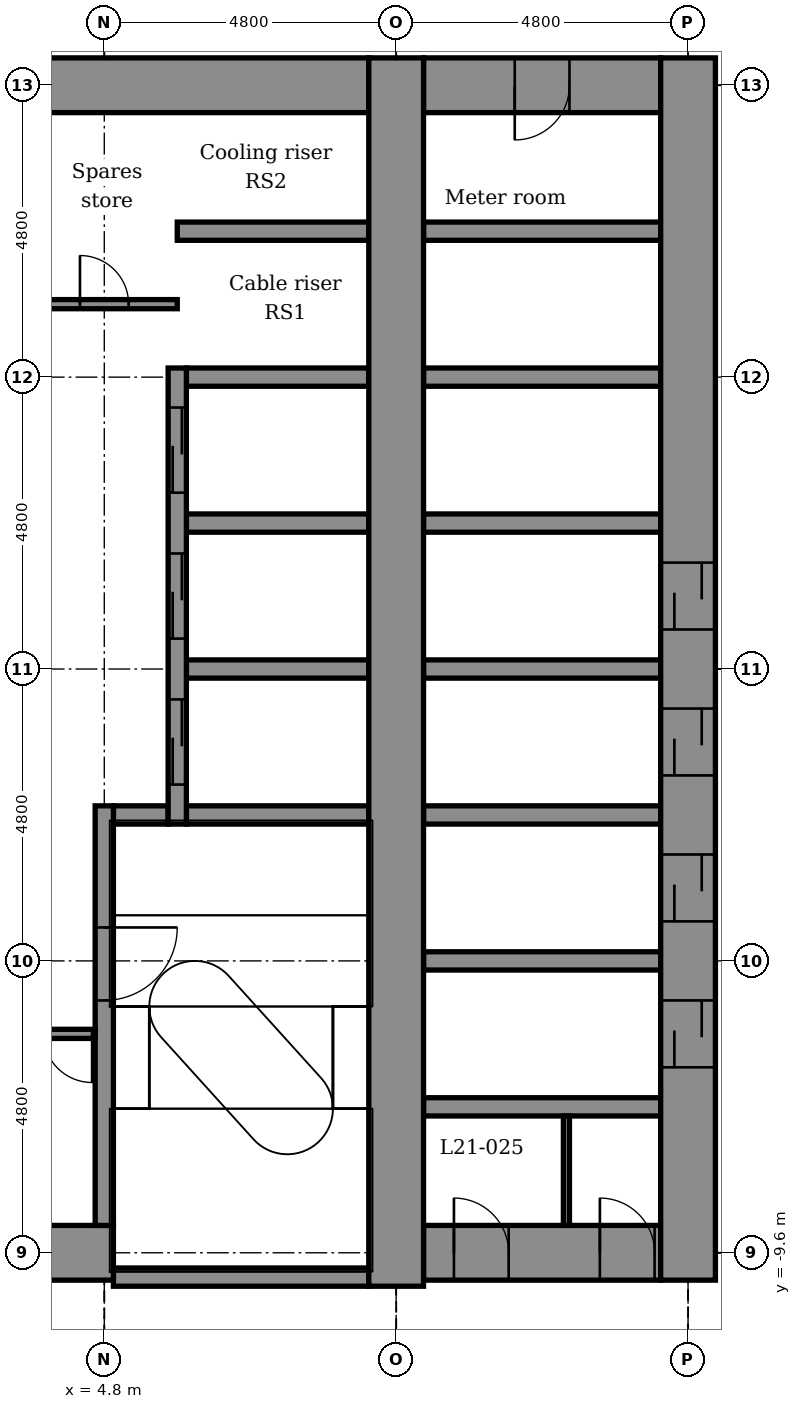
"""IFC4 building model, lengths in metres.
Left out: names, types, materials, properties, quantities, classifications, styles, units other than length and angle.
Written with IfcOpenShell. Run it as: python <this file> out.ifc"""

import sys

from ifc_helpers import new_model, si_unit, direction, frame, frame_2d, origin, place, context, subcontext, project, spatial, rectangle, extrude, element, fill, save


model = new_model("IFC4")
c1 = context("Model", 3, precision=1e-05, world=origin(), true_north=direction((0.0, 1.0)))
c2 = subcontext(c1, "Body", "Model", "MODEL_VIEW")
j1 = project(units=[si_unit("LENGTHUNIT", "METRE"), si_unit("PLANEANGLEUNIT", "RADIAN")], contexts=[c1])
p1 = place(None, origin())
s1 = spatial("IfcSite", under=j1, at=p1, CompositionType="ELEMENT")
p2 = place(p1, origin())
s2 = spatial("IfcBuilding", under=s1, at=p2, CompositionType="ELEMENT")
p3 = place(p2, frame((0.0, 0.0, 109.4)))
s3 = spatial("IfcBuildingStorey", under=s2, at=p3, CompositionType="ELEMENT", Elevation=109.4)
p4 = place(p3, frame((4.95, -10.0, -0.2), z_axis=(0.0, 0.0, 1.0), x_axis=(1.0, 0.0, 0.0)))
e1 = element("IfcWall", 1, at=p4, inside=s3, PredefinedType="STANDARD", context=c2, shape_type="SweptSolid", body=[
    extrude(rectangle(XDim=4.2, YDim=0.3, at=frame_2d((2.1, 0.0))), origin(), (0.0, 0.0, 1.0), 4.5),
])
p5 = place(p3, frame((-5.25, -9.6, -0.2), z_axis=(0.0, 0.0, 1.0), x_axis=(1.0, 0.0, 0.0)))
e2 = element("IfcWall", 2, at=p5, inside=s3, PredefinedType="SHEAR", context=c2, shape_type="SweptSolid", body=[
    extrude(rectangle(XDim=10.2, YDim=0.9, at=frame_2d((5.1, 0.0))), origin(), (0.0, 0.0, 1.0), 4.5),
])
p6 = place(p5, frame((0.6, 0.0, 0.2)))
e3 = element("IfcOpeningElement", 3, at=p6, cuts=e2, PredefinedType="OPENING", context=c2, shape_type="SweptSolid", body=[
    extrude(rectangle(XDim=0.9, YDim=2.1, at=frame_2d((0.45, 1.05))), frame((0.0, 0.46, 0.0), z_axis=(0.0, -1.0, 0.0), x_axis=(1.0, 0.0, 0.0)), (0.0, 0.0, 1.0), 0.92),
])
p7 = place(p3, frame((10.05, -9.6, -0.2), z_axis=(0.0, 0.0, 1.0), x_axis=(1.0, 0.0, 0.0)))
e4 = element("IfcWall", 4, at=p7, inside=s3, PredefinedType="SHEAR", context=c2, shape_type="SweptSolid", body=[
    extrude(rectangle(XDim=3.9, YDim=0.9, at=frame_2d((1.95, 0.0))), origin(), (0.0, 0.0, 1.0), 4.5),
])
p8 = place(p7, frame((0.5, 0.0, 0.2)))
e5 = element("IfcOpeningElement", 5, at=p8, cuts=e4, PredefinedType="OPENING", context=c2, shape_type="SweptSolid", body=[
    extrude(rectangle(XDim=0.9, YDim=2.1, at=frame_2d((0.45, 1.05))), frame((0.0, 0.46, 0.0), z_axis=(0.0, -1.0, 0.0), x_axis=(1.0, 0.0, 0.0)), (0.0, 0.0, 1.0), 0.92),
])
p9 = place(p7, frame((2.9, 0.0, 0.2)))
e6 = element("IfcOpeningElement", 6, at=p9, cuts=e4, PredefinedType="OPENING", context=c2, shape_type="SweptSolid", body=[
    extrude(rectangle(XDim=0.9, YDim=2.1, at=frame_2d((0.45, 1.05))), frame((0.0, 0.46, 0.0), z_axis=(0.0, -1.0, 0.0), x_axis=(1.0, 0.0, 0.0)), (0.0, 0.0, 1.0), 0.92),
])
for number, where, z_axis, x_axis in (
    (7, (10.05, -7.2, -0.2), (0.0, 0.0, 1.0), (1.0, 0.0, 0.0)),
    (8, (10.05, -4.8, -0.2), (0.0, 0.0, 1.0), (1.0, 0.0, 0.0)),
):
    element("IfcWall", number, at=place(p3, frame(where, z_axis=z_axis, x_axis=x_axis)), inside=s3, PredefinedType="STANDARD", context=c2, shape_type="SweptSolid", body=[
        extrude(rectangle(XDim=3.9, YDim=0.3, at=frame_2d((1.95, 0.0))), origin(), (0.0, 0.0, 1.0), 4.5),
    ])
p10 = place(p3, frame((4.95, -2.4, -0.2), z_axis=(0.0, 0.0, 1.0), x_axis=(1.0, 0.0, 0.0)))
e9 = element("IfcWall", 9, at=p10, inside=s3, PredefinedType="STANDARD", context=c2, shape_type="SweptSolid", body=[
    extrude(rectangle(XDim=0.9, YDim=0.3, at=frame_2d((0.45, 0.0))), origin(), (0.0, 0.0, 1.0), 4.5),
])
p11 = place(p3, frame((6.15, -2.4, -0.2), z_axis=(0.0, 0.0, 1.0), x_axis=(1.0, 0.0, 0.0)))
e10 = element("IfcWall", 10, at=p11, inside=s3, PredefinedType="STANDARD", context=c2, shape_type="SweptSolid", body=[
    extrude(rectangle(XDim=3.0, YDim=0.3, at=frame_2d((1.5, 0.0))), origin(), (0.0, 0.0, 1.0), 4.5),
])
p12 = place(p3, frame((10.05, -2.4, -0.2), z_axis=(0.0, 0.0, 1.0), x_axis=(1.0, 0.0, 0.0)))
e11 = element("IfcWall", 11, at=p12, inside=s3, PredefinedType="STANDARD", context=c2, shape_type="SweptSolid", body=[
    extrude(rectangle(XDim=3.9, YDim=0.3, at=frame_2d((1.95, 0.0))), origin(), (0.0, 0.0, 1.0), 4.5),
])
p13 = place(p3, frame((6.15, 0.0, -0.2), z_axis=(0.0, 0.0, 1.0), x_axis=(1.0, 0.0, 0.0)))
e12 = element("IfcWall", 12, at=p13, inside=s3, PredefinedType="STANDARD", context=c2, shape_type="SweptSolid", body=[
    extrude(rectangle(XDim=3.0, YDim=0.3, at=frame_2d((1.5, 0.0))), origin(), (0.0, 0.0, 1.0), 4.5),
])
p14 = place(p3, frame((10.05, 0.0, -0.2), z_axis=(0.0, 0.0, 1.0), x_axis=(1.0, 0.0, 0.0)))
e13 = element("IfcWall", 13, at=p14, inside=s3, PredefinedType="STANDARD", context=c2, shape_type="SweptSolid", body=[
    extrude(rectangle(XDim=3.9, YDim=0.3, at=frame_2d((1.95, 0.0))), origin(), (0.0, 0.0, 1.0), 4.5),
])
p15 = place(p3, frame((6.15, 2.4, -0.2), z_axis=(0.0, 0.0, 1.0), x_axis=(1.0, 0.0, 0.0)))
e14 = element("IfcWall", 14, at=p15, inside=s3, PredefinedType="STANDARD", context=c2, shape_type="SweptSolid", body=[
    extrude(rectangle(XDim=3.0, YDim=0.3, at=frame_2d((1.5, 0.0))), origin(), (0.0, 0.0, 1.0), 4.5),
])
p16 = place(p3, frame((10.05, 2.4, -0.2), z_axis=(0.0, 0.0, 1.0), x_axis=(1.0, 0.0, 0.0)))
e15 = element("IfcWall", 15, at=p16, inside=s3, PredefinedType="STANDARD", context=c2, shape_type="SweptSolid", body=[
    extrude(rectangle(XDim=3.9, YDim=0.3, at=frame_2d((1.95, 0.0))), origin(), (0.0, 0.0, 1.0), 4.5),
])
p17 = place(p3, frame((6.15, 4.8, -0.2), z_axis=(0.0, 0.0, 1.0), x_axis=(1.0, 0.0, 0.0)))
e16 = element("IfcWall", 16, at=p17, inside=s3, PredefinedType="STANDARD", context=c2, shape_type="SweptSolid", body=[
    extrude(rectangle(XDim=3.0, YDim=0.3, at=frame_2d((1.5, 0.0))), origin(), (0.0, 0.0, 1.0), 4.5),
])
p18 = place(p3, frame((10.05, 4.8, -0.2), z_axis=(0.0, 0.0, 1.0), x_axis=(1.0, 0.0, 0.0)))
e17 = element("IfcWall", 17, at=p18, inside=s3, PredefinedType="STANDARD", context=c2, shape_type="SweptSolid", body=[
    extrude(rectangle(XDim=3.9, YDim=0.3, at=frame_2d((1.95, 0.0))), origin(), (0.0, 0.0, 1.0), 4.5),
])
p19 = place(p3, frame((6.0, 7.2, -0.2), z_axis=(0.0, 0.0, 1.0), x_axis=(1.0, 0.0, 0.0)))
e18 = element("IfcWall", 18, at=p19, inside=s3, PredefinedType="STANDARD", context=c2, shape_type="SweptSolid", body=[
    extrude(rectangle(XDim=3.15, YDim=0.3, at=frame_2d((1.575, 0.0))), origin(), (0.0, 0.0, 1.0), 4.5),
])
p20 = place(p3, frame((10.05, 7.2, -0.2), z_axis=(0.0, 0.0, 1.0), x_axis=(1.0, 0.0, 0.0)))
e19 = element("IfcWall", 19, at=p20, inside=s3, PredefinedType="STANDARD", context=c2, shape_type="SweptSolid", body=[
    extrude(rectangle(XDim=3.9, YDim=0.3, at=frame_2d((1.95, 0.0))), origin(), (0.0, 0.0, 1.0), 4.5),
])
p21 = place(p3, frame((-5.25, 9.6, -0.2), z_axis=(0.0, 0.0, 1.0), x_axis=(1.0, 0.0, 0.0)))
e20 = element("IfcWall", 20, at=p21, inside=s3, PredefinedType="SHEAR", context=c2, shape_type="SweptSolid", body=[
    extrude(rectangle(XDim=14.4, YDim=0.9, at=frame_2d((7.2, 0.0))), origin(), (0.0, 0.0, 1.0), 4.5),
])
p22 = place(p21, frame((0.6, 0.0, 0.2)))
e21 = element("IfcOpeningElement", 21, at=p22, cuts=e20, PredefinedType="OPENING", context=c2, shape_type="SweptSolid", body=[
    extrude(rectangle(XDim=0.9, YDim=2.1, at=frame_2d((0.45, 1.05))), frame((0.0, 0.46, 0.0), z_axis=(0.0, -1.0, 0.0), x_axis=(1.0, 0.0, 0.0)), (0.0, 0.0, 1.0), 0.92),
])
p23 = place(p3, frame((10.05, 9.6, -0.2), z_axis=(0.0, 0.0, 1.0), x_axis=(1.0, 0.0, 0.0)))
e22 = element("IfcWall", 22, at=p23, inside=s3, PredefinedType="SHEAR", context=c2, shape_type="SweptSolid", body=[
    extrude(rectangle(XDim=3.9, YDim=0.9, at=frame_2d((1.95, 0.0))), origin(), (0.0, 0.0, 1.0), 4.5),
])
p24 = place(p23, frame((1.5, 0.0, 0.2)))
e23 = element("IfcOpeningElement", 23, at=p24, cuts=e22, PredefinedType="OPENING", context=c2, shape_type="SweptSolid", body=[
    extrude(rectangle(XDim=0.9, YDim=2.1, at=frame_2d((0.45, 1.05))), frame((0.0, 0.46, 0.0), z_axis=(0.0, -1.0, 0.0), x_axis=(1.0, 0.0, 0.0)), (0.0, 0.0, 1.0), 0.92),
])
p25 = place(p3, frame((4.8, -9.15, -0.2), z_axis=(0.0, 0.0, 1.0), x_axis=(0.0, 1.0, 0.0)))
e24 = element("IfcWall", 24, at=p25, inside=s3, PredefinedType="STANDARD", context=c2, shape_type="SweptSolid", body=[
    extrude(rectangle(XDim=6.9, YDim=0.3, at=frame_2d((3.45, 0.0))), origin(), (0.0, 0.0, 1.0), 4.5),
])
p26 = place(p25, frame((3.7, 0.0, 0.2)))
e25 = element("IfcOpeningElement", 25, at=p26, cuts=e24, PredefinedType="OPENING", context=c2, shape_type="SweptSolid", body=[
    extrude(rectangle(XDim=1.2, YDim=2.1, at=frame_2d((0.6, 1.05))), frame((0.0, 0.16, 0.0), z_axis=(0.0, -1.0, 0.0), x_axis=(1.0, 0.0, 0.0)), (0.0, 0.0, 1.0), 0.32),
])
p27 = place(p3, frame((6.0, -2.55, -0.2), z_axis=(0.0, 0.0, 1.0), x_axis=(0.0, 1.0, 0.0)))
e26 = element("IfcWall", 26, at=p27, inside=s3, PredefinedType="STANDARD", context=c2, shape_type="SweptSolid", body=[
    extrude(rectangle(XDim=7.5, YDim=0.3, at=frame_2d((3.75, 0.0))), origin(), (0.0, 0.0, 1.0), 4.5),
])
p28 = place(p27, frame((0.65, 0.0, 0.2)))
e27 = element("IfcOpeningElement", 27, at=p28, cuts=e26, PredefinedType="OPENING", context=c2, shape_type="SweptSolid", body=[
    extrude(rectangle(XDim=1.4, YDim=2.1, at=frame_2d((0.7, 1.05))), frame((0.0, 0.16, 0.0), z_axis=(0.0, -1.0, 0.0), x_axis=(1.0, 0.0, 0.0)), (0.0, 0.0, 1.0), 0.32),
])
p29 = place(p27, frame((3.05, 0.0, 0.2)))
e28 = element("IfcOpeningElement", 28, at=p29, cuts=e26, PredefinedType="OPENING", context=c2, shape_type="SweptSolid", body=[
    extrude(rectangle(XDim=1.4, YDim=2.1, at=frame_2d((0.7, 1.05))), frame((0.0, 0.16, 0.0), z_axis=(0.0, -1.0, 0.0), x_axis=(1.0, 0.0, 0.0)), (0.0, 0.0, 1.0), 0.32),
])
p30 = place(p27, frame((5.45, 0.0, 0.2)))
e29 = element("IfcOpeningElement", 29, at=p30, cuts=e26, PredefinedType="OPENING", context=c2, shape_type="SweptSolid", body=[
    extrude(rectangle(XDim=1.4, YDim=2.1, at=frame_2d((0.7, 1.05))), frame((0.0, 0.16, 0.0), z_axis=(0.0, -1.0, 0.0), x_axis=(1.0, 0.0, 0.0)), (0.0, 0.0, 1.0), 0.32),
])
p31 = place(p3, frame((9.6, -10.15, -0.2), z_axis=(0.0, 0.0, 1.0), x_axis=(0.0, 1.0, 0.0)))
e30 = element("IfcWall", 30, at=p31, inside=s3, PredefinedType="SHEAR", context=c2, shape_type="SweptSolid", body=[
    extrude(rectangle(XDim=20.2, YDim=0.9, at=frame_2d((10.1, 0.0))), origin(), (0.0, 0.0, 1.0), 4.5),
])
p32 = place(p3, frame((14.4, -10.05, -0.2), z_axis=(0.0, 0.0, 1.0), x_axis=(0.0, 1.0, 0.0)))
e31 = element("IfcWall", 31, at=p32, inside=s3, PredefinedType="SHEAR", context=c2, shape_type="SweptSolid", body=[
    extrude(rectangle(XDim=20.1, YDim=0.9, at=frame_2d((10.05, 0.0))), origin(), (0.0, 0.0, 1.0), 4.5),
])
p33 = place(p32, frame((3.5, 0.0, 0.2)))
e32 = element("IfcOpeningElement", 32, at=p33, cuts=e31, PredefinedType="OPENING", context=c2, shape_type="SweptSolid", body=[
    extrude(rectangle(XDim=1.1, YDim=2.1, at=frame_2d((0.55, 1.05))), frame((0.0, 0.46, 0.0), z_axis=(0.0, -1.0, 0.0), x_axis=(1.0, 0.0, 0.0)), (0.0, 0.0, 1.0), 0.92),
])
p34 = place(p32, frame((5.9, 0.0, 0.2)))
e33 = element("IfcOpeningElement", 33, at=p34, cuts=e31, PredefinedType="OPENING", context=c2, shape_type="SweptSolid", body=[
    extrude(rectangle(XDim=1.1, YDim=2.1, at=frame_2d((0.55, 1.05))), frame((0.0, 0.46, 0.0), z_axis=(0.0, -1.0, 0.0), x_axis=(1.0, 0.0, 0.0)), (0.0, 0.0, 1.0), 0.92),
])
p35 = place(p32, frame((8.3, 0.0, 0.2)))
e34 = element("IfcOpeningElement", 34, at=p35, cuts=e31, PredefinedType="OPENING", context=c2, shape_type="SweptSolid", body=[
    extrude(rectangle(XDim=1.1, YDim=2.1, at=frame_2d((0.55, 1.05))), frame((0.0, 0.46, 0.0), z_axis=(0.0, -1.0, 0.0), x_axis=(1.0, 0.0, 0.0)), (0.0, 0.0, 1.0), 0.92),
])
p36 = place(p32, frame((10.7, 0.0, 0.2)))
e35 = element("IfcOpeningElement", 35, at=p36, cuts=e31, PredefinedType="OPENING", context=c2, shape_type="SweptSolid", body=[
    extrude(rectangle(XDim=1.1, YDim=2.1, at=frame_2d((0.55, 1.05))), frame((0.0, 0.46, 0.0), z_axis=(0.0, -1.0, 0.0), x_axis=(1.0, 0.0, 0.0)), (0.0, 0.0, 1.0), 0.92),
])
p37 = place(p3, frame((12.4, -9.15, 0.0), z_axis=(0.0, 0.0, 1.0), x_axis=(0.0, 1.0, 0.0)))
e36 = element("IfcWall", 36, at=p37, inside=s3, PredefinedType="PARTITIONING", context=c2, shape_type="SweptSolid", body=[
    extrude(rectangle(XDim=1.8, YDim=0.1, at=frame_2d((0.9, 0.0))), origin(), (0.0, 0.0, 1.0), 4.3),
])
p38 = place(p3, frame((3.75, -6.0, 0.0), z_axis=(0.0, 0.0, 1.0), x_axis=(1.0, 0.0, 0.0)))
e37 = element("IfcWall", 37, at=p38, inside=s3, PredefinedType="PARTITIONING", context=c2, shape_type="SweptSolid", body=[
    extrude(rectangle(XDim=0.9, YDim=0.15, at=frame_2d((0.45, 0.0))), origin(), (0.0, 0.0, 1.0), 4.3),
])
p39 = place(p38, frame((0.05, 0.0, 0.0)))
e38 = element("IfcOpeningElement", 38, at=p39, cuts=e37, PredefinedType="OPENING", context=c2, shape_type="SweptSolid", body=[
    extrude(rectangle(XDim=0.8, YDim=2.1, at=frame_2d((0.4, 1.05))), frame((0.0, 0.085, 0.0), z_axis=(0.0, -1.0, 0.0), x_axis=(1.0, 0.0, 0.0)), (0.0, 0.0, 1.0), 0.17),
])
p40 = place(p3, frame((3.75, 6.0, 0.0), z_axis=(0.0, 0.0, 1.0), x_axis=(1.0, 0.0, 0.0)))
e39 = element("IfcWall", 39, at=p40, inside=s3, PredefinedType="PARTITIONING", context=c2, shape_type="SweptSolid", body=[
    extrude(rectangle(XDim=2.25, YDim=0.15, at=frame_2d((1.125, 0.0))), origin(), (0.0, 0.0, 1.0), 4.3),
])
p41 = place(p40, frame((0.65, 0.0, 0.0)))
e40 = element("IfcOpeningElement", 40, at=p41, cuts=e39, PredefinedType="OPENING", context=c2, shape_type="SweptSolid", body=[
    extrude(rectangle(XDim=0.8, YDim=2.1, at=frame_2d((0.4, 1.05))), frame((0.0, 0.085, 0.0), z_axis=(0.0, -1.0, 0.0), x_axis=(1.0, 0.0, 0.0)), (0.0, 0.0, 1.0), 0.17),
])
p42 = place(p41, origin())
e41 = element("IfcDoor", 41, at=p42, inside=s3, OperationType="SINGLE_SWING_LEFT", PredefinedType="DOOR", context=c2, shape_type="SweptSolid", body=[
    extrude(rectangle(XDim=0.8, YDim=2.1, at=frame_2d((0.4, 1.05))), frame((0.0, 0.025, 0.0), z_axis=(0.0, -1.0, 0.0), x_axis=(1.0, 0.0, 0.0)), (0.0, 0.0, 1.0), 0.05),
])
fill(e40, e41)
p43 = place(p39, frame((0.8, 0.0, 0.0), z_axis=(0.0, 0.0, 1.0), x_axis=(-1.0, 0.0, 0.0)))
e42 = element("IfcDoor", 42, at=p43, inside=s3, OperationType="SINGLE_SWING_RIGHT", PredefinedType="DOOR", context=c2, shape_type="SweptSolid", body=[
    extrude(rectangle(XDim=0.8, YDim=2.1, at=frame_2d((0.4, 1.05))), frame((0.0, 0.025, 0.0), z_axis=(0.0, -1.0, 0.0), x_axis=(1.0, 0.0, 0.0)), (0.0, 0.0, 1.0), 0.05),
])
fill(e38, e42)
p44 = place(p28, origin())
e43 = element("IfcDoor", 43, at=p44, inside=s3, OperationType="DOUBLE_DOOR_SLIDING", PredefinedType="DOOR", context=c2, shape_type="SweptSolid", body=[
    extrude(rectangle(XDim=1.4, YDim=2.1, at=frame_2d((0.7, 1.05))), frame((0.0, 0.025, 0.0), z_axis=(0.0, -1.0, 0.0), x_axis=(1.0, 0.0, 0.0)), (0.0, 0.0, 1.0), 0.05),
])
fill(e27, e43)
p45 = place(p29, origin())
e44 = element("IfcDoor", 44, at=p45, inside=s3, OperationType="DOUBLE_DOOR_SLIDING", PredefinedType="DOOR", context=c2, shape_type="SweptSolid", body=[
    extrude(rectangle(XDim=1.4, YDim=2.1, at=frame_2d((0.7, 1.05))), frame((0.0, 0.025, 0.0), z_axis=(0.0, -1.0, 0.0), x_axis=(1.0, 0.0, 0.0)), (0.0, 0.0, 1.0), 0.05),
])
fill(e28, e44)
p46 = place(p30, origin())
e45 = element("IfcDoor", 45, at=p46, inside=s3, OperationType="DOUBLE_DOOR_SLIDING", PredefinedType="DOOR", context=c2, shape_type="SweptSolid", body=[
    extrude(rectangle(XDim=1.4, YDim=2.1, at=frame_2d((0.7, 1.05))), frame((0.0, 0.025, 0.0), z_axis=(0.0, -1.0, 0.0), x_axis=(1.0, 0.0, 0.0)), (0.0, 0.0, 1.0), 0.05),
])
fill(e29, e45)
p47 = place(p33, origin())
e46 = element("IfcDoor", 46, at=p47, inside=s3, OperationType="DOUBLE_DOOR_SLIDING", PredefinedType="DOOR", context=c2, shape_type="SweptSolid", body=[
    extrude(rectangle(XDim=1.1, YDim=2.1, at=frame_2d((0.55, 1.05))), frame((0.0, 0.025, 0.0), z_axis=(0.0, -1.0, 0.0), x_axis=(1.0, 0.0, 0.0)), (0.0, 0.0, 1.0), 0.05),
])
fill(e32, e46)
p48 = place(p34, origin())
e47 = element("IfcDoor", 47, at=p48, inside=s3, OperationType="DOUBLE_DOOR_SLIDING", PredefinedType="DOOR", context=c2, shape_type="SweptSolid", body=[
    extrude(rectangle(XDim=1.1, YDim=2.1, at=frame_2d((0.55, 1.05))), frame((0.0, 0.025, 0.0), z_axis=(0.0, -1.0, 0.0), x_axis=(1.0, 0.0, 0.0)), (0.0, 0.0, 1.0), 0.05),
])
fill(e33, e47)
p49 = place(p35, origin())
e48 = element("IfcDoor", 48, at=p49, inside=s3, OperationType="DOUBLE_DOOR_SLIDING", PredefinedType="DOOR", context=c2, shape_type="SweptSolid", body=[
    extrude(rectangle(XDim=1.1, YDim=2.1, at=frame_2d((0.55, 1.05))), frame((0.0, 0.025, 0.0), z_axis=(0.0, -1.0, 0.0), x_axis=(1.0, 0.0, 0.0)), (0.0, 0.0, 1.0), 0.05),
])
fill(e34, e48)
p50 = place(p36, origin())
e49 = element("IfcDoor", 49, at=p50, inside=s3, OperationType="DOUBLE_DOOR_SLIDING", PredefinedType="DOOR", context=c2, shape_type="SweptSolid", body=[
    extrude(rectangle(XDim=1.1, YDim=2.1, at=frame_2d((0.55, 1.05))), frame((0.0, 0.025, 0.0), z_axis=(0.0, -1.0, 0.0), x_axis=(1.0, 0.0, 0.0)), (0.0, 0.0, 1.0), 0.05),
])
fill(e35, e49)
p51 = place(p26, frame((1.2, 0.0, 0.0), z_axis=(0.0, 0.0, 1.0), x_axis=(-1.0, 0.0, 0.0)))
e50 = element("IfcDoor", 50, at=p51, inside=s3, OperationType="SINGLE_SWING_RIGHT", PredefinedType="DOOR", context=c2, shape_type="SweptSolid", body=[
    extrude(rectangle(XDim=1.2, YDim=2.1, at=frame_2d((0.6, 1.05))), frame((0.0, 0.025, 0.0), z_axis=(0.0, -1.0, 0.0), x_axis=(1.0, 0.0, 0.0)), (0.0, 0.0, 1.0), 0.05),
])
fill(e25, e50)
p52 = place(p8, origin())
e51 = element("IfcDoor", 51, at=p52, inside=s3, OperationType="SINGLE_SWING_LEFT", PredefinedType="DOOR", context=c2, shape_type="SweptSolid", body=[
    extrude(rectangle(XDim=0.9, YDim=2.1, at=frame_2d((0.45, 1.05))), frame((0.0, 0.025, 0.0), z_axis=(0.0, -1.0, 0.0), x_axis=(1.0, 0.0, 0.0)), (0.0, 0.0, 1.0), 0.05),
])
fill(e5, e51)
p53 = place(p9, origin())
e52 = element("IfcDoor", 52, at=p53, inside=s3, OperationType="SINGLE_SWING_LEFT", PredefinedType="DOOR", context=c2, shape_type="SweptSolid", body=[
    extrude(rectangle(XDim=0.9, YDim=2.1, at=frame_2d((0.45, 1.05))), frame((0.0, 0.025, 0.0), z_axis=(0.0, -1.0, 0.0), x_axis=(1.0, 0.0, 0.0)), (0.0, 0.0, 1.0), 0.05),
])
fill(e6, e52)
p54 = place(p24, frame((0.9, 0.0, 0.0), z_axis=(0.0, 0.0, 1.0), x_axis=(-1.0, 0.0, 0.0)))
e53 = element("IfcDoor", 53, at=p54, inside=s3, OperationType="SINGLE_SWING_LEFT", PredefinedType="DOOR", context=c2, shape_type="SweptSolid", body=[
    extrude(rectangle(XDim=0.9, YDim=2.1, at=frame_2d((0.45, 1.05))), frame((0.0, 0.025, 0.0), z_axis=(0.0, -1.0, 0.0), x_axis=(1.0, 0.0, 0.0)), (0.0, 0.0, 1.0), 0.05),
])
fill(e23, e53)
save(model, sys.argv[1])
